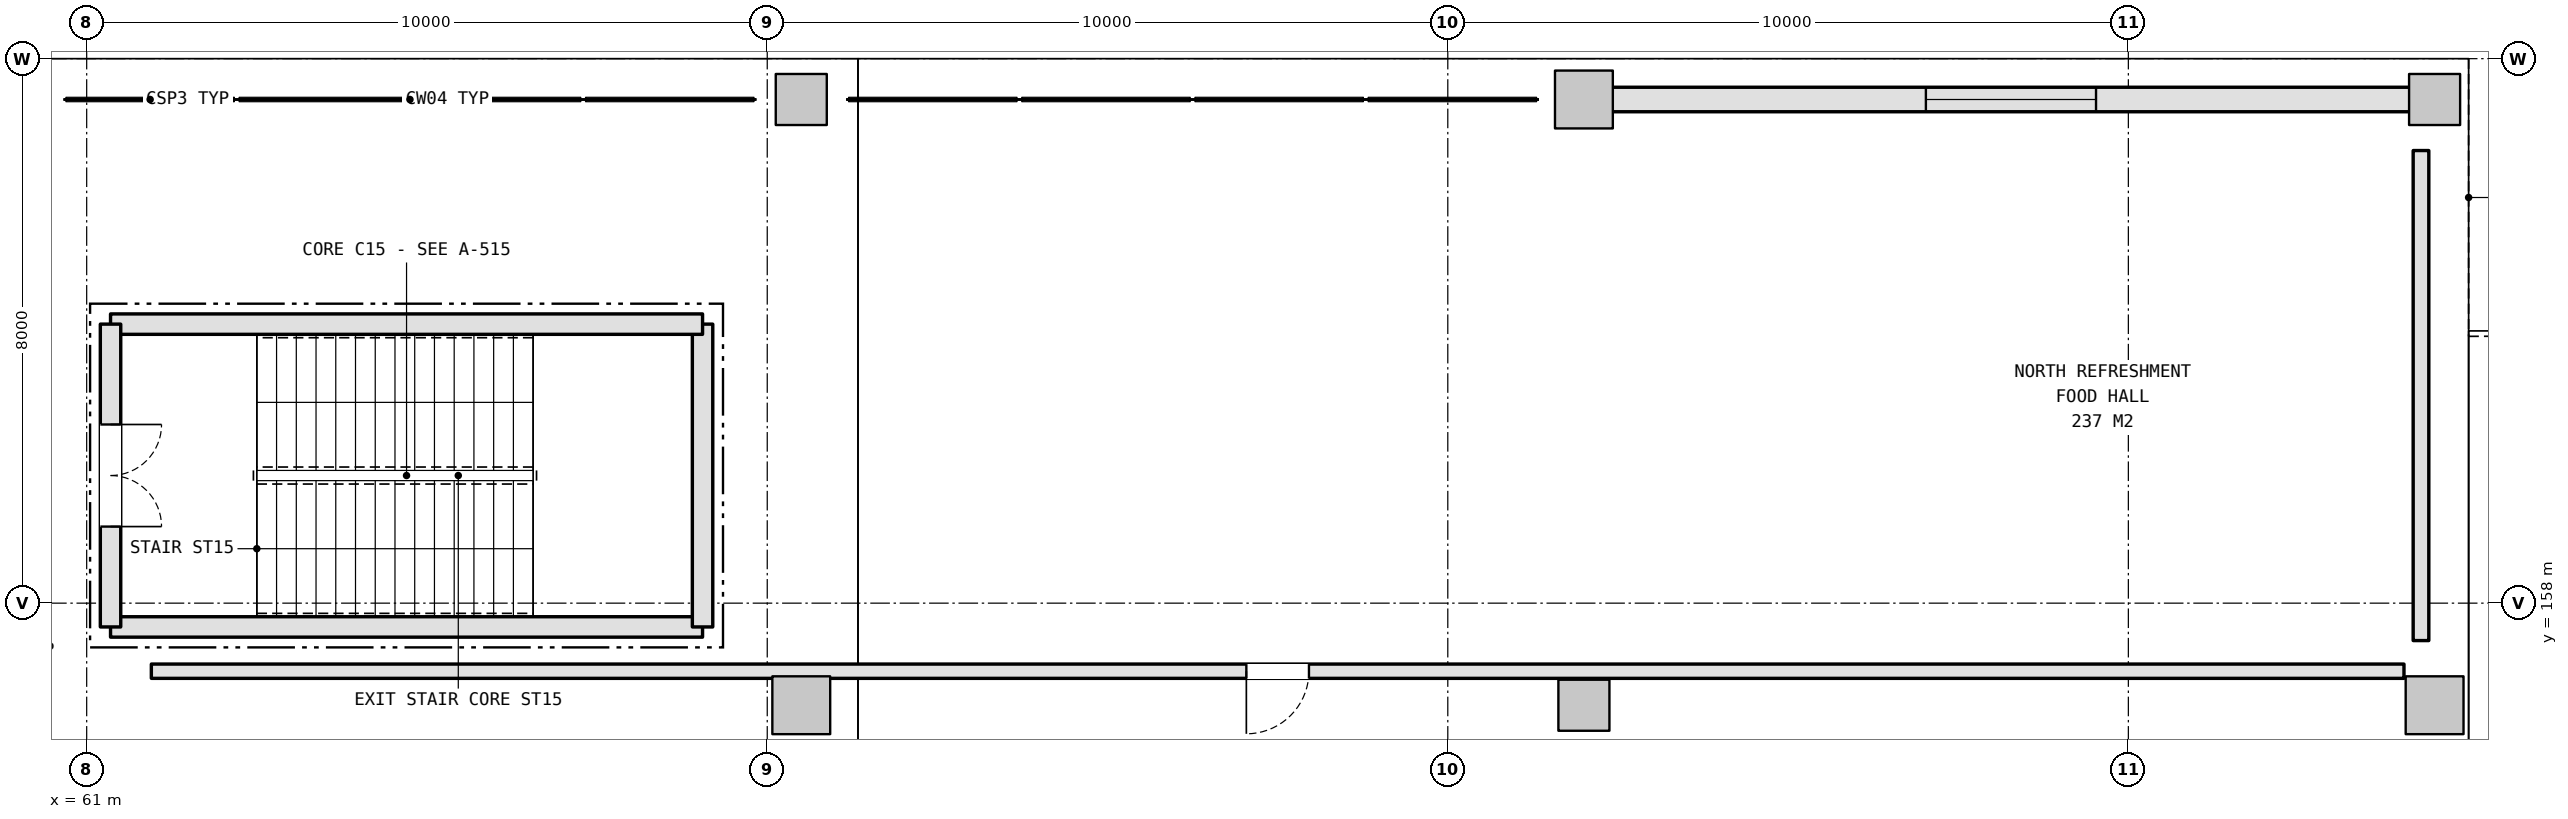
"""IFC4 building model, lengths in metres.
Left out: names, types, materials, properties, quantities, classifications, styles, units other than length and angle.
Written with IfcOpenShell. Run it as: python <this file> out.ifc"""

import sys

from ifc_helpers import new_model, si_unit, direction, frame, frame_2d, origin, origin_2d, place, context, subcontext, project, spatial, rectangle, extrude, element, fill, save


model = new_model("IFC4")
c1 = context("Model", 3, precision=1e-05, world=origin(), true_north=direction((0.0, 1.0)))
c2 = subcontext(c1, "Body", "Model", "MODEL_VIEW")
j1 = project(units=[si_unit("LENGTHUNIT", "METRE"), si_unit("PLANEANGLEUNIT", "RADIAN")], contexts=[c1])
p1 = place(None, origin())
s1 = spatial("IfcSite", under=j1, at=p1, CompositionType="ELEMENT")
p2 = place(p1, origin())
s2 = spatial("IfcBuilding", under=s1, at=p2, CompositionType="ELEMENT")
p3 = place(p2, frame((0.0, 0.0, 5.4)))
s3 = spatial("IfcBuildingStorey", under=s2, at=p3, CompositionType="ELEMENT", Elevation=5.4)
p4 = place(p3, frame((71.5, 156.5, 0.0), z_axis=(0.0, 0.0, 1.0), x_axis=(1.0, 0.0, 0.0)))
e1 = element("IfcColumn", 1, at=p4, inside=s3, PredefinedType="COLUMN", context=c2, shape_type="SweptSolid", body=[
    extrude(rectangle(XDim=0.85, YDim=0.85, at=origin_2d()), origin(), (0.0, 0.0, 1.0), 5.4),
])
for number, where, z_axis, x_axis in (
    (2, (71.5, 165.4, 0.0), (0.0, 0.0, 1.0), (1.0, 0.0, 0.0)),
    (3, (83.0, 156.5, 0.0), (0.0, 0.0, 1.0), (1.0, 0.0, 0.0)),
):
    element("IfcColumn", number, at=place(p3, frame(where, z_axis=z_axis, x_axis=x_axis)), inside=s3, PredefinedType="COLUMN", context=c2, shape_type="SweptSolid", body=[
        extrude(rectangle(XDim=0.75, YDim=0.75, at=origin_2d()), origin(), (0.0, 0.0, 1.0), 5.4),
    ])
for number, where, z_axis, x_axis in (
    (4, (83.0, 165.4, 0.0), (0.0, 0.0, 1.0), (1.0, 0.0, 0.0)),
    (5, (95.5, 156.5, 0.0), (0.0, 0.0, 1.0), (1.0, 0.0, 0.0)),
):
    element("IfcColumn", number, at=place(p3, frame(where, z_axis=z_axis, x_axis=x_axis)), inside=s3, PredefinedType="COLUMN", context=c2, shape_type="SweptSolid", body=[
        extrude(rectangle(XDim=0.85, YDim=0.85, at=origin_2d()), origin(), (0.0, 0.0, 1.0), 5.4),
    ])
p5 = place(p3, frame((95.5, 165.4, 0.0), z_axis=(0.0, 0.0, 1.0), x_axis=(1.0, 0.0, 0.0)))
e6 = element("IfcColumn", 6, at=p5, inside=s3, PredefinedType="COLUMN", context=c2, shape_type="SweptSolid", body=[
    extrude(rectangle(XDim=0.75, YDim=0.75, at=origin_2d()), origin(), (0.0, 0.0, 1.0), 5.4),
])
p6 = place(p3, frame((83.413, 165.4, 0.0), z_axis=(0.0, 0.0, 1.0), x_axis=(1.0, 0.0, 0.0)))
e7 = element("IfcWall", 7, at=p6, inside=s3, PredefinedType="SOLIDWALL", context=c2, shape_type="SweptSolid", body=[
    extrude(rectangle(XDim=11.724, YDim=0.36, at=frame_2d((5.862, 0.0))), origin(), (0.0, 0.0, 1.0), 4.475),
])
p7 = place(p6, frame((4.612, 0.0, 1.05)))
e8 = element("IfcOpeningElement", 8, at=p7, cuts=e7, PredefinedType="OPENING", context=c2, shape_type="SweptSolid", body=[
    extrude(rectangle(XDim=2.5, YDim=2.0, at=frame_2d((1.25, 1.0))), frame((0.0, 0.19, 0.0), z_axis=(0.0, -1.0, 0.0), x_axis=(1.0, 0.0, 0.0)), (0.0, 0.0, 1.0), 0.38),
])
p8 = place(p3, frame((61.35, 157.65, 0.0), z_axis=(0.0, 0.0, 1.0), x_axis=(1.0, 0.0, 0.0)))
e9 = element("IfcWall", 9, at=p8, inside=s3, PredefinedType="SHEAR", context=c2, shape_type="SweptSolid", body=[
    extrude(rectangle(XDim=8.699, YDim=0.3, at=frame_2d((4.35, 0.0))), origin(), (0.0, 0.0, 1.0), 5.14),
])
p9 = place(p3, frame((70.05, 157.65, 0.0), z_axis=(0.0, 0.0, 1.0), x_axis=(0.0, 1.0, 0.0)))
e10 = element("IfcWall", 10, at=p9, inside=s3, PredefinedType="SHEAR", context=c2, shape_type="SweptSolid", body=[
    extrude(rectangle(XDim=4.449, YDim=0.3, at=frame_2d((2.225, 0.0))), origin(), (0.0, 0.0, 1.0), 5.14),
])
p10 = place(p3, frame((70.05, 162.1, 0.0), z_axis=(0.0, 0.0, 1.0), x_axis=(-1.0, 0.0, 0.0)))
e11 = element("IfcWall", 11, at=p10, inside=s3, PredefinedType="SHEAR", context=c2, shape_type="SweptSolid", body=[
    extrude(rectangle(XDim=8.699, YDim=0.3, at=frame_2d((4.35, 0.0))), origin(), (0.0, 0.0, 1.0), 5.14),
])
p11 = place(p3, frame((61.35, 162.1, 0.0), z_axis=(0.0, 0.0, 1.0), x_axis=(0.0, -1.0, 0.0)))
e12 = element("IfcWall", 12, at=p11, inside=s3, PredefinedType="SHEAR", context=c2, shape_type="SweptSolid", body=[
    extrude(rectangle(XDim=4.449, YDim=0.3, at=frame_2d((2.225, 0.0))), origin(), (0.0, 0.0, 1.0), 5.14),
])
p12 = place(p11, frame((1.475, 0.0, 0.0)))
e13 = element("IfcOpeningElement", 13, at=p12, cuts=e12, PredefinedType="OPENING", context=c2, shape_type="SweptSolid", body=[
    extrude(rectangle(XDim=1.5, YDim=2.2, at=frame_2d((0.75, 1.1))), frame((0.0, 0.16, 0.0), z_axis=(0.0, -1.0, 0.0), x_axis=(1.0, 0.0, 0.0)), (0.0, 0.0, 1.0), 0.32),
])
p13 = place(p3, frame((95.05, 157.0, 0.0), z_axis=(0.0, 0.0, 1.0), x_axis=(-1.0, 0.0, 0.0)))
e14 = element("IfcWall", 14, at=p13, inside=s3, PredefinedType="PLUMBINGWALL", context=c2, shape_type="SweptSolid", body=[
    extrude(rectangle(XDim=33.1, YDim=0.21, at=frame_2d((16.55, 0.0))), origin(), (0.0, 0.0, 1.0), 4.525),
])
p14 = place(p13, frame((16.09, 0.0, 0.0)))
e15 = element("IfcOpeningElement", 15, at=p14, cuts=e14, PredefinedType="OPENING", context=c2, shape_type="SweptSolid", body=[
    extrude(rectangle(XDim=0.92, YDim=2.1, at=frame_2d((0.46, 1.05))), frame((0.0, 0.115, 0.0), z_axis=(0.0, -1.0, 0.0), x_axis=(1.0, 0.0, 0.0)), (0.0, 0.0, 1.0), 0.23),
])
p15 = place(p3, frame((95.3, 164.65, 0.0), z_axis=(0.0, 0.0, 1.0), x_axis=(0.0, -1.0, 0.0)))
e16 = element("IfcWall", 16, at=p15, inside=s3, PredefinedType="PLUMBINGWALL", context=c2, shape_type="SweptSolid", body=[
    extrude(rectangle(XDim=7.2, YDim=0.23, at=frame_2d((3.6, 0.0))), origin(), (0.0, 0.0, 1.0), 4.475),
])
p16 = place(p7, origin())
e17 = element("IfcWindow", 17, at=p16, inside=s3, PartitioningType="SINGLE_PANEL", PredefinedType="WINDOW", context=c2, shape_type="SweptSolid", body=[
    extrude(rectangle(XDim=2.5, YDim=2.0, at=frame_2d((1.25, 1.0))), frame((0.0, 0.03, 0.0), z_axis=(0.0, -1.0, 0.0), x_axis=(1.0, 0.0, 0.0)), (0.0, 0.0, 1.0), 0.06),
])
fill(e8, e17)
p17 = place(p12, origin())
e18 = element("IfcDoor", 18, at=p17, inside=s3, OperationType="DOUBLE_DOOR_SINGLE_SWING", PredefinedType="DOOR", context=c2, shape_type="SweptSolid", body=[
    extrude(rectangle(XDim=1.5, YDim=2.2, at=frame_2d((0.75, 1.1))), frame((0.0, 0.025, 0.0), z_axis=(0.0, -1.0, 0.0), x_axis=(1.0, 0.0, 0.0)), (0.0, 0.0, 1.0), 0.05),
])
fill(e13, e18)
p18 = place(p14, origin())
e19 = element("IfcDoor", 19, at=p18, inside=s3, OperationType="SINGLE_SWING_RIGHT", PredefinedType="DOOR", context=c2, shape_type="SweptSolid", body=[
    extrude(rectangle(XDim=0.92, YDim=2.1, at=frame_2d((0.46, 1.05))), frame((0.0, 0.025, 0.0), z_axis=(0.0, -1.0, 0.0), x_axis=(1.0, 0.0, 0.0)), (0.0, 0.0, 1.0), 0.05),
])
fill(e15, e19)
save(model, sys.argv[1])
